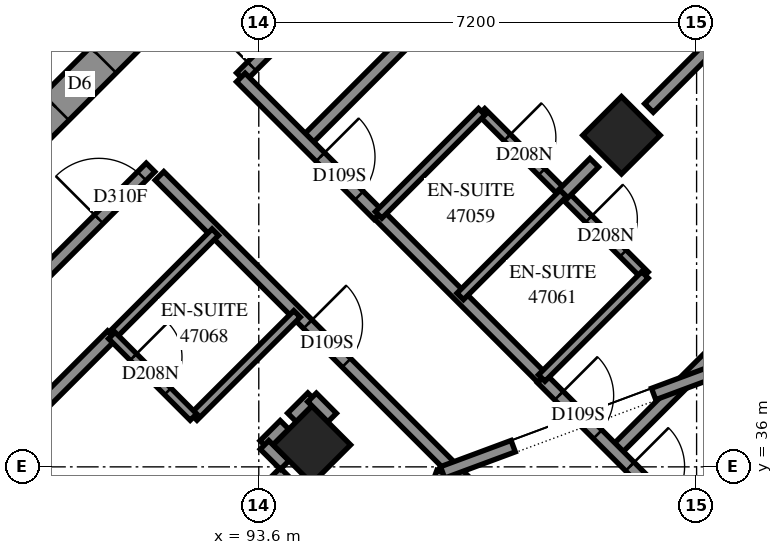
"""IFC4 building model, lengths in metres.
Left out: names, types, materials, properties, quantities, classifications, styles, units other than length and angle.
Written with IfcOpenShell. Run it as: python <this file> out.ifc"""

import sys

from ifc_helpers import new_model, si_unit, direction, frame, frame_2d, origin, origin_2d, place, context, subcontext, project, spatial, polyline, rectangle, outline, extrude, element, fill, save


model = new_model("IFC4")
c1 = context("Model", 3, precision=1e-05, world=origin(), true_north=direction((0.0, 1.0)))
c2 = subcontext(c1, "Body", "Model", "MODEL_VIEW")
j1 = project(units=[si_unit("LENGTHUNIT", "METRE"), si_unit("PLANEANGLEUNIT", "RADIAN")], contexts=[c1])
p1 = place(None, origin())
s1 = spatial("IfcSite", under=j1, at=p1, CompositionType="ELEMENT")
p2 = place(p1, origin())
s2 = spatial("IfcBuilding", under=s1, at=p2, CompositionType="ELEMENT")
p3 = place(p2, frame((0.0, 0.0, 172.8)))
s3 = spatial("IfcBuildingStorey", under=s2, at=p3, CompositionType="ELEMENT", Elevation=172.8)
for number, where, z_axis, x_axis in (
    (1, (99.565, 41.453, 0.0), (0.0, 0.0, 1.0), (0.707, -0.707, 0.0)),
    (2, (94.474, 36.362, 0.0), (0.0, 0.0, 1.0), (0.707, -0.707, 0.0)),
):
    element("IfcColumn", number, at=place(p3, frame(where, z_axis=z_axis, x_axis=x_axis)), inside=s3, PredefinedType="COLUMN", context=c2, shape_type="SweptSolid", body=[
        extrude(rectangle(XDim=0.9, YDim=0.9, at=origin_2d()), origin(), (0.0, 0.0, 1.0), 3.1),
    ])
p4 = place(p3, frame((87.049, 38.695, -0.3), z_axis=(0.0, 0.0, 1.0), x_axis=(0.7071067812, 0.7071067812, 0.0)))
e3 = element("IfcWall", 3, at=p4, inside=s3, PredefinedType="SHEAR", context=c2, shape_type="SweptSolid", body=[
    extrude(rectangle(XDim=14.4, YDim=0.6, at=frame_2d((7.2, 0.0))), origin(), (0.0, 0.0, 1.0), 2.7),
])
p5 = place(p4, frame((4.55, 0.0, 0.3)))
e4 = element("IfcOpeningElement", 4, at=p5, cuts=e3, PredefinedType="OPENING", context=c2, shape_type="SweptSolid", body=[
    extrude(rectangle(XDim=1.1, YDim=2.1, at=frame_2d((0.55, 1.05))), frame((0.0, 0.31, 0.0), z_axis=(0.0, -1.0, 0.0), x_axis=(1.0, 0.0, 0.0)), (0.0, 0.0, 1.0), 0.62),
])
p6 = place(p4, frame((11.35, 0.0, 0.3)))
e5 = element("IfcOpeningElement", 5, at=p6, cuts=e3, PredefinedType="OPENING", context=c2, shape_type="SweptSolid", body=[
    extrude(rectangle(XDim=1.1, YDim=2.1, at=frame_2d((0.55, 1.05))), frame((0.0, 0.31, 0.0), z_axis=(0.0, -1.0, 0.0), x_axis=(1.0, 0.0, 0.0)), (0.0, 0.0, 1.0), 0.62),
])
p7 = place(p3, frame((96.623, 35.909, 0.0), z_axis=(0.0, 0.0, 1.0), x_axis=(-0.3481832062, -0.9374265064, 0.0)))
e6 = element("IfcWall", 6, at=p7, inside=s3, PredefinedType="PARAPET", context=c2, shape_type="SweptSolid", body=[
    extrude(outline(polyline([(-0.046, -0.1), (5.24, -0.1), (5.336, 0.1), (0.046, 0.1), (-0.046, -0.1)])), origin(), (0.0, 0.0, 1.0), 0.25),
])
p8 = place(p3, frame((94.366, 41.348, 0.0), z_axis=(0.0, 0.0, 1.0), x_axis=(0.7071108825, 0.7071026798, 0.0)))
e7 = element("IfcWall", 7, at=p8, inside=s3, PredefinedType="PARTITIONING", context=c2, shape_type="SweptSolid", body=[
    extrude(rectangle(XDim=12.191, YDim=0.2, at=frame_2d((6.096, 0.0))), origin(), (0.0, 0.0, 1.0), 3.1),
])
p9 = place(p3, frame((91.967, 40.785, 0.0), z_axis=(0.0, 0.0, 1.0), x_axis=(0.7071067812, -0.7071067812, 0.0)))
e8 = element("IfcWall", 8, at=p9, inside=s3, PredefinedType="PARTITIONING", context=c2, shape_type="SweptSolid", body=[
    extrude(rectangle(XDim=12.1, YDim=0.2, at=frame_2d((6.05, 0.0))), origin(), (0.0, 0.0, 1.0), 3.1),
])
p10 = place(p9, frame((3.448, 0.0, 0.0)))
e9 = element("IfcOpeningElement", 9, at=p10, cuts=e8, PredefinedType="OPENING", context=c2, shape_type="SweptSolid", body=[
    extrude(rectangle(XDim=0.9, YDim=2.1, at=frame_2d((0.45, 1.05))), frame((0.0, 0.11, 0.0), z_axis=(0.0, -1.0, 0.0), x_axis=(1.0, 0.0, 0.0)), (0.0, 0.0, 1.0), 0.22),
])
p11 = place(p9, frame((8.457, 0.0, 0.0)))
e10 = element("IfcOpeningElement", 10, at=p11, cuts=e8, PredefinedType="OPENING", context=c2, shape_type="SweptSolid", body=[
    extrude(rectangle(XDim=1.0, YDim=2.1, at=frame_2d((0.5, 1.05))), frame((0.0, 0.11, 0.0), z_axis=(0.0, -1.0, 0.0), x_axis=(1.0, 0.0, 0.0)), (0.0, 0.0, 1.0), 0.22),
])
p12 = place(p3, frame((93.306, 42.408, 0.0), z_axis=(0.0, 0.0, 1.0), x_axis=(0.7071067812, 0.7071067812, 0.0)))
e11 = element("IfcWall", 11, at=p12, inside=s3, PredefinedType="PARTITIONING", context=c2, shape_type="SweptSolid", body=[
    extrude(rectangle(XDim=9.45, YDim=0.2, at=frame_2d((4.725, 0.0))), origin(), (0.0, 0.0, 1.0), 3.1),
])
p13 = place(p12, frame((0.253, 0.0, 0.0)))
e12 = element("IfcOpeningElement", 12, at=p13, cuts=e11, PredefinedType="OPENING", context=c2, shape_type="SweptSolid", body=[
    extrude(rectangle(XDim=1.0, YDim=2.1, at=frame_2d((0.5, 1.05))), frame((0.0, 0.11, 0.0), z_axis=(0.0, -1.0, 0.0), x_axis=(1.0, 0.0, 0.0)), (0.0, 0.0, 1.0), 0.22),
])
p14 = place(p3, frame((86.834, 35.94, 0.0), z_axis=(0.0, 0.0, 1.0), x_axis=(0.7072486139, 0.7069649201, 0.0)))
e13 = element("IfcWall", 13, at=p14, inside=s3, PredefinedType="PARTITIONING", context=c2, shape_type="SweptSolid", body=[
    extrude(rectangle(XDim=7.05, YDim=0.2, at=frame_2d((3.525, 0.0))), origin(), (0.0, 0.0, 1.0), 3.1),
])
p15 = place(p14, frame((5.848, 0.0, 0.0)))
e14 = element("IfcOpeningElement", 14, at=p15, cuts=e13, PredefinedType="OPENING", context=c2, shape_type="SweptSolid", body=[
    extrude(rectangle(XDim=1.0, YDim=2.1, at=frame_2d((0.5, 1.05))), frame((0.0, 0.11, 0.0), z_axis=(0.0, -1.0, 0.0), x_axis=(1.0, 0.0, 0.0)), (0.0, 0.0, 1.0), 0.22),
])
p16 = place(p3, frame((86.33, 33.314, 0.0), z_axis=(0.0, 0.0, 1.0), x_axis=(0.7072524653, 0.7069610671, 0.0)))
e15 = element("IfcWall", 15, at=p16, inside=s3, PredefinedType="PARTITIONING", context=c2, shape_type="SweptSolid", body=[
    extrude(rectangle(XDim=6.864, YDim=0.2, at=frame_2d((3.432, 0.0))), origin(), (0.0, 0.0, 1.0), 3.1),
])
p17 = place(p3, frame((99.458, 36.256, 0.0), z_axis=(0.0, 0.0, 1.0), x_axis=(0.7071067812, 0.7071067812, 0.0)))
e16 = element("IfcWall", 16, at=p17, inside=s3, PredefinedType="PARTITIONING", context=c2, shape_type="SweptSolid", body=[
    extrude(rectangle(XDim=6.85, YDim=0.2, at=frame_2d((3.425, 0.0))), origin(), (0.0, 0.0, 1.0), 3.1),
])
p18 = place(p3, frame((89.831, 31.721, 0.0), z_axis=(0.0, 0.0, 1.0), x_axis=(0.7071067812, 0.7071067812, 0.0)))
e17 = element("IfcWall", 17, at=p18, inside=s3, PredefinedType="PARTITIONING", context=c2, shape_type="SweptSolid", body=[
    extrude(rectangle(XDim=5.928, YDim=0.2, at=frame_2d((2.964, 0.0))), origin(), (0.0, 0.0, 1.0), 2.6),
])
p19 = place(p3, frame((100.017, 41.901, 0.0), z_axis=(0.0, 0.0, 1.0), x_axis=(0.7072754814, 0.7069380408, 0.0)))
e18 = element("IfcWall", 18, at=p19, inside=s3, PredefinedType="PARTITIONING", context=c2, shape_type="SweptSolid", body=[
    extrude(rectangle(XDim=5.927, YDim=0.2, at=frame_2d((2.963, 0.0))), origin(), (0.0, 0.0, 1.0), 3.1),
])
p20 = place(p3, frame((98.253, 37.455, 0.0), z_axis=(0.0, 0.0, 1.0), x_axis=(0.7071067812, -0.7071067812, 0.0)))
e19 = element("IfcWall", 19, at=p20, inside=s3, PredefinedType="PARTITIONING", context=c2, shape_type="SweptSolid", body=[
    extrude(rectangle(XDim=5.301, YDim=0.2, at=frame_2d((2.65, 0.0))), origin(), (0.0, 0.0, 1.0), 3.1),
])
p21 = place(p20, frame((0.401, 0.0, 0.0)))
e20 = element("IfcOpeningElement", 20, at=p21, cuts=e19, PredefinedType="OPENING", context=c2, shape_type="SweptSolid", body=[
    extrude(rectangle(XDim=0.9, YDim=2.1, at=frame_2d((0.45, 1.05))), frame((0.0, 0.11, 0.0), z_axis=(0.0, -1.0, 0.0), x_axis=(1.0, 0.0, 0.0)), (0.0, 0.0, 1.0), 0.22),
])
p22 = place(p20, frame((2.05, 0.0, 0.0)))
e21 = element("IfcOpeningElement", 21, at=p22, cuts=e19, PredefinedType="OPENING", context=c2, shape_type="SweptSolid", body=[
    extrude(rectangle(XDim=0.9, YDim=2.1, at=frame_2d((0.45, 1.05))), frame((0.0, 0.11, 0.0), z_axis=(0.0, -1.0, 0.0), x_axis=(1.0, 0.0, 0.0)), (0.0, 0.0, 1.0), 0.22),
])
p23 = place(p3, frame((97.263, 41.839, 0.0), z_axis=(0.0, 0.0, 1.0), x_axis=(0.7071067812, -0.7071067812, 0.0)))
e22 = element("IfcWall", 22, at=p23, inside=s3, PredefinedType="PARTITIONING", context=c2, shape_type="SweptSolid", body=[
    extrude(rectangle(XDim=3.801, YDim=0.15, at=frame_2d((1.901, 0.0))), origin(), (0.0, 0.0, 1.0), 3.1),
])
p24 = place(p23, frame((0.598, 0.0, 0.0)))
e23 = element("IfcOpeningElement", 23, at=p24, cuts=e22, PredefinedType="OPENING", context=c2, shape_type="SweptSolid", body=[
    extrude(rectangle(XDim=0.8, YDim=2.1, at=frame_2d((0.4, 1.05))), frame((0.0, 0.085, 0.0), z_axis=(0.0, -1.0, 0.0), x_axis=(1.0, 0.0, 0.0)), (0.0, 0.0, 1.0), 0.17),
])
p25 = place(p23, frame((2.493, 0.0, 0.0)))
e24 = element("IfcOpeningElement", 24, at=p25, cuts=e22, PredefinedType="OPENING", context=c2, shape_type="SweptSolid", body=[
    extrude(rectangle(XDim=0.8, YDim=2.1, at=frame_2d((0.4, 1.05))), frame((0.0, 0.085, 0.0), z_axis=(0.0, -1.0, 0.0), x_axis=(1.0, 0.0, 0.0)), (0.0, 0.0, 1.0), 0.17),
])
p26 = place(p3, frame((95.573, 40.148, 0.0), z_axis=(0.0, 0.0, 1.0), x_axis=(0.7068698107, -0.7073436723, 0.0)))
e25 = element("IfcWall", 25, at=p26, inside=s3, PredefinedType="PARTITIONING", context=c2, shape_type="SweptSolid", body=[
    extrude(rectangle(XDim=3.799, YDim=0.2, at=frame_2d((1.899, 0.0))), origin(), (0.0, 0.0, 1.0), 3.1),
])
p27 = place(p3, frame((93.305, 42.403, 0.0), z_axis=(0.0, 0.0, 1.0), x_axis=(0.7071067812, -0.7071067812, 0.0)))
e26 = element("IfcWall", 26, at=p27, inside=s3, PredefinedType="PARTITIONING", context=c2, shape_type="SweptSolid", body=[
    extrude(rectangle(XDim=3.199, YDim=0.2, at=frame_2d((1.599, 0.0))), origin(), (0.0, 0.0, 1.0), 3.1),
])
p28 = place(p27, frame((1.848, 0.0, 0.0)))
e27 = element("IfcOpeningElement", 27, at=p28, cuts=e26, PredefinedType="OPENING", context=c2, shape_type="SweptSolid", body=[
    extrude(rectangle(XDim=0.9, YDim=2.1, at=frame_2d((0.45, 1.05))), frame((0.0, 0.11, 0.0), z_axis=(0.0, -1.0, 0.0), x_axis=(1.0, 0.0, 0.0)), (0.0, 0.0, 1.0), 0.22),
])
for number, where, z_axis, x_axis in (
    (28, (95.571, 40.143, 0.0), (0.0, 0.0, 1.0), (0.707, 0.708, 0.0)),
    (29, (98.253, 37.461, 0.0), (0.0, 0.0, 1.0), (0.708, 0.707, 0.0)),
    (30, (100.657, 35.057, 0.0), (0.0, 0.0, 1.0), (0.708, 0.707, 0.0)),
    (31, (91.189, 38.161, 0.0), (0.0, 0.0, 1.0), (0.707, 0.708, 0.0)),
    (32, (92.531, 36.819, 0.0), (0.0, 0.0, 1.0), (0.708, 0.707, 0.0)),
):
    element("IfcWall", number, at=place(p3, frame(where, z_axis=z_axis, x_axis=x_axis)), inside=s3, PredefinedType="PARTITIONING", context=c2, shape_type="SweptSolid", body=[
        extrude(rectangle(XDim=2.4, YDim=0.15, at=frame_2d((1.2, 0.0))), origin(), (0.0, 0.0, 1.0), 3.1),
    ])
p29 = place(p3, frame((96.913, 38.803, 0.0), z_axis=(0.0, 0.0, 1.0), x_axis=(0.7071067812, 0.7071067812, 0.0)))
e33 = element("IfcWall", 33, at=p29, inside=s3, PredefinedType="PARTITIONING", context=c2, shape_type="SweptSolid", body=[
    extrude(rectangle(XDim=2.398, YDim=0.15, at=frame_2d((1.199, 0.0))), origin(), (0.0, 0.0, 1.0), 2.6),
])
p30 = place(p3, frame((91.183, 38.161, 0.0), z_axis=(0.0, 0.0, 1.0), x_axis=(0.7071067812, -0.7071067812, 0.0)))
e34 = element("IfcWall", 34, at=p30, inside=s3, PredefinedType="PARTITIONING", context=c2, shape_type="SweptSolid", body=[
    extrude(rectangle(XDim=1.898, YDim=0.15, at=frame_2d((0.949, 0.0))), origin(), (0.0, 0.0, 1.0), 3.1),
])
p31 = place(p30, frame((0.501, 0.0, 0.0)))
e35 = element("IfcOpeningElement", 35, at=p31, cuts=e34, PredefinedType="OPENING", context=c2, shape_type="SweptSolid", body=[
    extrude(rectangle(XDim=0.8, YDim=2.1, at=frame_2d((0.4, 1.05))), frame((0.0, 0.085, 0.0), z_axis=(0.0, -1.0, 0.0), x_axis=(1.0, 0.0, 0.0)), (0.0, 0.0, 1.0), 0.17),
])
p32 = place(p3, frame((98.613, 40.495, 0.0), z_axis=(0.0, 0.0, 1.0), x_axis=(0.7057051861, 0.7085056035, 0.0)))
e36 = element("IfcWall", 36, at=p32, inside=s3, PredefinedType="PARTITIONING", context=c2, shape_type="SweptSolid", body=[
    extrude(rectangle(XDim=0.714, YDim=0.2, at=frame_2d((0.357, 0.0))), origin(), (0.0, 0.0, 1.0), 2.6),
])
for number, where, z_axis, x_axis in (
    (37, (94.145, 36.813, 0.0), (0.0, 0.0, 1.0), (0.707, 0.707, 0.0)),
    (38, (93.691, 36.359, 0.0), (0.0, 0.0, 1.0), (0.707, 0.707, 0.0)),
):
    element("IfcWall", number, at=place(p3, frame(where, z_axis=z_axis, x_axis=x_axis)), inside=s3, PredefinedType="PARTITIONING", context=c2, shape_type="SweptSolid", body=[
        extrude(rectangle(XDim=0.469, YDim=0.2, at=frame_2d((0.235, 0.0))), origin(), (0.0, 0.0, 1.0), 3.1),
    ])
for number, where, z_axis, x_axis in (
    (39, (94.476, 37.142, 0.0), (0.0, 0.0, 1.0), (0.705, -0.709, 0.0)),
    (40, (93.695, 36.361, 0.0), (0.0, 0.0, 1.0), (0.709, -0.705, 0.0)),
):
    element("IfcWall", number, at=place(p3, frame(where, z_axis=z_axis, x_axis=x_axis)), inside=s3, PredefinedType="PARTITIONING", context=c2, shape_type="SweptSolid", body=[
        extrude(rectangle(XDim=0.468, YDim=0.2, at=frame_2d((0.234, 0.0))), origin(), (0.0, 0.0, 1.0), 3.1),
    ])
p33 = place(p3, frame((101.581, 37.751, 0.0), z_axis=(0.0, 0.0, 1.0), x_axis=(-0.9374282115, -0.3481786155, 0.0)))
e41 = element("IfcWall", 41, at=p33, inside=s3, PredefinedType="PARAPET", context=c2, shape_type="SweptSolid", body=[
    extrude(outline(polyline([(0.048, -0.1), (1.586, -0.1), (1.586, 0.1), (-0.048, 0.1), (0.048, -0.1)])), origin(), (0.0, 0.0, 1.0), 0.25),
])
p34 = place(p3, frame((97.784, 36.34, 0.0), z_axis=(0.0, 0.0, 1.0), x_axis=(-0.9374199992, -0.3482007252, 0.0)))
e42 = element("IfcWall", 42, at=p34, inside=s3, PredefinedType="PARAPET", context=c2, shape_type="SweptSolid", body=[
    extrude(outline(polyline([(0.0, -0.1), (1.284, -0.1), (1.192, 0.1), (0.0, 0.1), (0.0, -0.1)])), origin(), (0.0, 0.0, 1.0), 0.25),
])
p35 = place(p5, origin())
e43 = element("IfcDoor", 43, at=p35, inside=s3, OperationType="DOUBLE_DOOR_SINGLE_SWING", PredefinedType="DOOR", context=c2, shape_type="SweptSolid", body=[
    extrude(rectangle(XDim=1.1, YDim=2.1, at=frame_2d((0.55, 1.05))), frame((0.0, 0.025, 0.0), z_axis=(0.0, -1.0, 0.0), x_axis=(1.0, 0.0, 0.0)), (0.0, 0.0, 1.0), 0.05),
])
fill(e4, e43)
p36 = place(p13, origin())
e44 = element("IfcDoor", 44, at=p36, inside=s3, OperationType="SINGLE_SWING_RIGHT", PredefinedType="DOOR", context=c2, shape_type="SweptSolid", body=[
    extrude(rectangle(XDim=1.0, YDim=2.1, at=frame_2d((0.5, 1.05))), frame((0.0, 0.025, 0.0), z_axis=(0.0, -1.0, 0.0), x_axis=(1.0, 0.0, 0.0)), (0.0, 0.0, 1.0), 0.05),
])
fill(e12, e44)
p37 = place(p28, origin())
e45 = element("IfcDoor", 45, at=p37, inside=s3, OperationType="SINGLE_SWING_RIGHT", PredefinedType="DOOR", context=c2, shape_type="SweptSolid", body=[
    extrude(rectangle(XDim=0.9, YDim=2.1, at=frame_2d((0.45, 1.05))), frame((0.0, 0.025, 0.0), z_axis=(0.0, -1.0, 0.0), x_axis=(1.0, 0.0, 0.0)), (0.0, 0.0, 1.0), 0.05),
])
fill(e27, e45)
p38 = place(p24, origin())
e46 = element("IfcDoor", 46, at=p38, inside=s3, OperationType="SINGLE_SWING_RIGHT", PredefinedType="DOOR", context=c2, shape_type="SweptSolid", body=[
    extrude(rectangle(XDim=0.8, YDim=2.1, at=frame_2d((0.4, 1.05))), frame((0.0, 0.025, 0.0), z_axis=(0.0, -1.0, 0.0), x_axis=(1.0, 0.0, 0.0)), (0.0, 0.0, 1.0), 0.05),
])
fill(e23, e46)
p39 = place(p21, origin())
e47 = element("IfcDoor", 47, at=p39, inside=s3, OperationType="SINGLE_SWING_LEFT", PredefinedType="DOOR", context=c2, shape_type="SweptSolid", body=[
    extrude(rectangle(XDim=0.9, YDim=2.1, at=frame_2d((0.45, 1.05))), frame((0.0, 0.025, 0.0), z_axis=(0.0, -1.0, 0.0), x_axis=(1.0, 0.0, 0.0)), (0.0, 0.0, 1.0), 0.05),
])
fill(e20, e47)
p40 = place(p25, origin())
e48 = element("IfcDoor", 48, at=p40, inside=s3, OperationType="SINGLE_SWING_RIGHT", PredefinedType="DOOR", context=c2, shape_type="SweptSolid", body=[
    extrude(rectangle(XDim=0.8, YDim=2.1, at=frame_2d((0.4, 1.05))), frame((0.0, 0.025, 0.0), z_axis=(0.0, -1.0, 0.0), x_axis=(1.0, 0.0, 0.0)), (0.0, 0.0, 1.0), 0.05),
])
fill(e24, e48)
p41 = place(p15, origin())
e49 = element("IfcDoor", 49, at=p41, inside=s3, OperationType="SINGLE_SWING_RIGHT", PredefinedType="DOOR", context=c2, shape_type="SweptSolid", body=[
    extrude(rectangle(XDim=1.0, YDim=2.1, at=frame_2d((0.5, 1.05))), frame((0.0, 0.025, 0.0), z_axis=(0.0, -1.0, 0.0), x_axis=(1.0, 0.0, 0.0)), (0.0, 0.0, 1.0), 0.05),
])
fill(e14, e49)
p42 = place(p10, origin())
e50 = element("IfcDoor", 50, at=p42, inside=s3, OperationType="SINGLE_SWING_LEFT", PredefinedType="DOOR", context=c2, shape_type="SweptSolid", body=[
    extrude(rectangle(XDim=0.9, YDim=2.1, at=frame_2d((0.45, 1.05))), frame((0.0, 0.025, 0.0), z_axis=(0.0, -1.0, 0.0), x_axis=(1.0, 0.0, 0.0)), (0.0, 0.0, 1.0), 0.05),
])
fill(e9, e50)
p43 = place(p31, origin())
e51 = element("IfcDoor", 51, at=p43, inside=s3, OperationType="SINGLE_SWING_RIGHT", PredefinedType="DOOR", context=c2, shape_type="SweptSolid", body=[
    extrude(rectangle(XDim=0.8, YDim=2.1, at=frame_2d((0.4, 1.05))), frame((0.0, 0.025, 0.0), z_axis=(0.0, -1.0, 0.0), x_axis=(1.0, 0.0, 0.0)), (0.0, 0.0, 1.0), 0.05),
])
fill(e35, e51)
p44 = place(p22, origin())
e52 = element("IfcDoor", 52, at=p44, inside=s3, OperationType="SINGLE_SWING_RIGHT", PredefinedType="DOOR", context=c2, shape_type="SweptSolid", body=[
    extrude(rectangle(XDim=0.9, YDim=2.1, at=frame_2d((0.45, 1.05))), frame((0.0, 0.025, 0.0), z_axis=(0.0, -1.0, 0.0), x_axis=(1.0, 0.0, 0.0)), (0.0, 0.0, 1.0), 0.05),
])
fill(e21, e52)
save(model, sys.argv[1])
